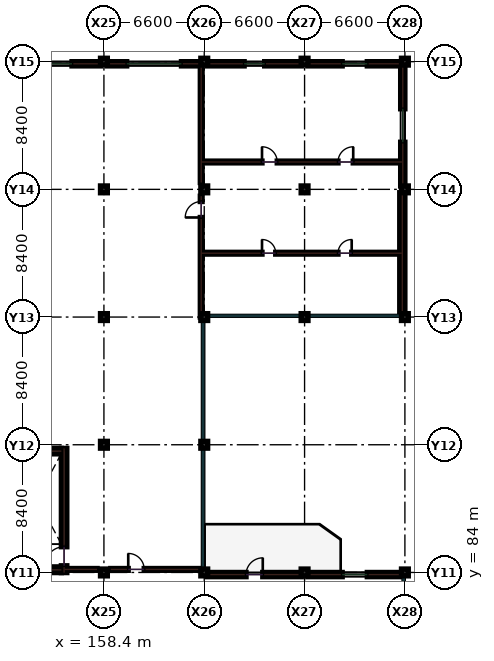
"""IFC4 building model, lengths in metres.
Left out: names, types, materials, properties, quantities, classifications, styles, units other than length and angle.
Written with IfcOpenShell. Run it as: python <this file> out.ifc"""

import sys

from ifc_helpers import new_model, si_unit, direction, frame, frame_2d, origin, origin_2d, place, context, subcontext, project, spatial, rectangle, extrude, element, fill, save


model = new_model("IFC4")
c1 = context("Model", 3, precision=1e-05, world=origin(), true_north=direction((0.0, 1.0)))
c2 = subcontext(c1, "Body", "Model", "MODEL_VIEW")
j1 = project(units=[si_unit("LENGTHUNIT", "METRE"), si_unit("PLANEANGLEUNIT", "RADIAN")], contexts=[c1])
p1 = place(None, origin())
s1 = spatial("IfcSite", under=j1, at=p1, CompositionType="ELEMENT")
p2 = place(p1, origin())
s2 = spatial("IfcBuilding", under=s1, at=p2, CompositionType="ELEMENT")
p3 = place(p2, frame((0.0, 0.0, 14.4)))
s3 = spatial("IfcBuildingStorey", under=s2, at=p3, CompositionType="ELEMENT", Elevation=14.4)
for number, where, z_axis, x_axis in (
    (1, (158.4, 84.0, 0.0), (0.0, 0.0, 1.0), (1.0, 0.0, 0.0)),
    (2, (158.4, 92.4, 0.0), (0.0, 0.0, 1.0), (1.0, 0.0, 0.0)),
    (3, (158.4, 100.8, 0.0), (0.0, 0.0, 1.0), (1.0, 0.0, 0.0)),
    (4, (158.4, 109.2, 0.0), (0.0, 0.0, 1.0), (1.0, 0.0, 0.0)),
    (5, (158.4, 117.6, 0.0), (0.0, 0.0, 1.0), (1.0, 0.0, 0.0)),
    (6, (165.0, 84.0, 0.0), (0.0, 0.0, 1.0), (1.0, 0.0, 0.0)),
    (7, (165.0, 92.4, 0.0), (0.0, 0.0, 1.0), (1.0, 0.0, 0.0)),
    (8, (165.0, 100.8, 0.0), (0.0, 0.0, 1.0), (1.0, 0.0, 0.0)),
    (9, (165.0, 109.2, 0.0), (0.0, 0.0, 1.0), (1.0, 0.0, 0.0)),
    (10, (165.0, 117.6, 0.0), (0.0, 0.0, 1.0), (1.0, 0.0, 0.0)),
    (11, (171.6, 84.0, 0.0), (0.0, 0.0, 1.0), (1.0, 0.0, 0.0)),
    (12, (171.6, 100.8, 0.0), (0.0, 0.0, 1.0), (1.0, 0.0, 0.0)),
    (13, (171.6, 109.2, 0.0), (0.0, 0.0, 1.0), (1.0, 0.0, 0.0)),
    (14, (171.6, 117.6, 0.0), (0.0, 0.0, 1.0), (1.0, 0.0, 0.0)),
    (15, (178.2, 84.0, 0.0), (0.0, 0.0, 1.0), (1.0, 0.0, 0.0)),
    (16, (178.2, 100.8, 0.0), (0.0, 0.0, 1.0), (1.0, 0.0, 0.0)),
    (17, (178.2, 109.2, 0.0), (0.0, 0.0, 1.0), (1.0, 0.0, 0.0)),
    (18, (178.2, 117.6, 0.0), (0.0, 0.0, 1.0), (1.0, 0.0, 0.0)),
):
    element("IfcColumn", number, at=place(p3, frame(where, z_axis=z_axis, x_axis=x_axis)), inside=s3, PredefinedType="COLUMN", context=c2, shape_type="SweptSolid", body=[
        extrude(rectangle(XDim=0.45, YDim=0.45, at=origin_2d()), origin(), (0.0, 0.0, 1.0), 4.2),
    ])
p4 = place(p3, frame((155.8, 84.2, 0.0), z_axis=(0.0, 0.0, 1.0), x_axis=(1.0, 0.0, 0.0)))
e19 = element("IfcWall", 19, at=p4, inside=s3, PredefinedType="PARTITIONING", context=c2, shape_type="SweptSolid", body=[
    extrude(rectangle(XDim=2.15, YDim=0.12, at=frame_2d((1.075, 0.0))), origin(), (0.0, 0.0, 1.0), 3.19),
])
p5 = place(p3, frame((158.85, 84.2, 0.0), z_axis=(0.0, 0.0, 1.0), x_axis=(1.0, 0.0, 0.0)))
e20 = element("IfcWall", 20, at=p5, inside=s3, PredefinedType="PARTITIONING", context=c2, shape_type="SweptSolid", body=[
    extrude(rectangle(XDim=5.83, YDim=0.12, at=frame_2d((2.915, 0.0))), origin(), (0.0, 0.0, 1.0), 3.19),
])
p6 = place(p5, frame((1.15, 0.0, 0.0)))
e21 = element("IfcOpeningElement", 21, at=p6, cuts=e20, PredefinedType="OPENING", context=c2, shape_type="SweptSolid", body=[
    extrude(rectangle(XDim=1.05, YDim=2.15, at=frame_2d((0.525, 1.075))), frame((0.0, 0.07, 0.0), z_axis=(0.0, -1.0, 0.0), x_axis=(1.0, 0.0, 0.0)), (0.0, 0.0, 1.0), 0.14),
])
p7 = place(p3, frame((164.8, 100.8, 0.0), z_axis=(0.0, 0.0, 1.0), x_axis=(0.0, 1.0, 0.0)))
e22 = element("IfcWall", 22, at=p7, inside=s3, PredefinedType="PARTITIONING", context=c2, shape_type="SweptSolid", body=[
    extrude(rectangle(XDim=7.95, YDim=0.12, at=frame_2d((3.975, 0.0))), origin(), (0.0, 0.0, 1.0), 3.19),
])
p8 = place(p7, frame((6.55, 0.0, 0.0)))
e23 = element("IfcOpeningElement", 23, at=p8, cuts=e22, PredefinedType="OPENING", context=c2, shape_type="SweptSolid", body=[
    extrude(rectangle(XDim=1.05, YDim=2.15, at=frame_2d((0.525, 1.075))), frame((0.0, 0.07, 0.0), z_axis=(0.0, -1.0, 0.0), x_axis=(1.0, 0.0, 0.0)), (0.0, 0.0, 1.0), 0.14),
])
p9 = place(p3, frame((164.8, 109.65, 0.0), z_axis=(0.0, 0.0, 1.0), x_axis=(0.0, 1.0, 0.0)))
e24 = element("IfcWall", 24, at=p9, inside=s3, PredefinedType="PARTITIONING", context=c2, shape_type="SweptSolid", body=[
    extrude(rectangle(XDim=7.63, YDim=0.12, at=frame_2d((3.815, 0.0))), origin(), (0.0, 0.0, 1.0), 3.19),
])
p10 = place(p3, frame((164.8, 105.0, 0.0), z_axis=(0.0, 0.0, 1.0), x_axis=(1.0, 0.0, 0.0)))
e25 = element("IfcWall", 25, at=p10, inside=s3, PredefinedType="PARTITIONING", context=c2, shape_type="SweptSolid", body=[
    extrude(rectangle(XDim=13.2, YDim=0.12, at=frame_2d((6.6, 0.0))), origin(), (0.0, 0.0, 1.0), 3.19),
])
p11 = place(p10, frame((4.0, 0.0, 0.0)))
e26 = element("IfcOpeningElement", 26, at=p11, cuts=e25, PredefinedType="OPENING", context=c2, shape_type="SweptSolid", body=[
    extrude(rectangle(XDim=0.9, YDim=2.1, at=frame_2d((0.45, 1.05))), frame((0.0, 0.07, 0.0), z_axis=(0.0, -1.0, 0.0), x_axis=(1.0, 0.0, 0.0)), (0.0, 0.0, 1.0), 0.14),
])
p12 = place(p10, frame((9.0, 0.0, 0.0)))
e27 = element("IfcOpeningElement", 27, at=p12, cuts=e25, PredefinedType="OPENING", context=c2, shape_type="SweptSolid", body=[
    extrude(rectangle(XDim=0.9, YDim=2.1, at=frame_2d((0.45, 1.05))), frame((0.0, 0.07, 0.0), z_axis=(0.0, -1.0, 0.0), x_axis=(1.0, 0.0, 0.0)), (0.0, 0.0, 1.0), 0.14),
])
p13 = place(p3, frame((164.8, 111.0, 0.0), z_axis=(0.0, 0.0, 1.0), x_axis=(1.0, 0.0, 0.0)))
e28 = element("IfcWall", 28, at=p13, inside=s3, PredefinedType="PARTITIONING", context=c2, shape_type="SweptSolid", body=[
    extrude(rectangle(XDim=13.2, YDim=0.12, at=frame_2d((6.6, 0.0))), origin(), (0.0, 0.0, 1.0), 3.19),
])
p14 = place(p13, frame((4.0, 0.0, 0.0)))
e29 = element("IfcOpeningElement", 29, at=p14, cuts=e28, PredefinedType="OPENING", context=c2, shape_type="SweptSolid", body=[
    extrude(rectangle(XDim=1.0, YDim=2.2, at=frame_2d((0.5, 1.1))), frame((0.0, 0.07, 0.0), z_axis=(0.0, -1.0, 0.0), x_axis=(1.0, 0.0, 0.0)), (0.0, 0.0, 1.0), 0.14),
])
p15 = place(p13, frame((9.0, 0.0, 0.0)))
e30 = element("IfcOpeningElement", 30, at=p15, cuts=e28, PredefinedType="OPENING", context=c2, shape_type="SweptSolid", body=[
    extrude(rectangle(XDim=1.0, YDim=2.2, at=frame_2d((0.5, 1.1))), frame((0.0, 0.07, 0.0), z_axis=(0.0, -1.0, 0.0), x_axis=(1.0, 0.0, 0.0)), (0.0, 0.0, 1.0), 0.14),
])
p16 = place(p3, frame((158.18, 117.46, 0.0), z_axis=(0.0, 0.0, 1.0), x_axis=(-1.0, 0.0, 0.0)))
e31 = element("IfcWall", 31, at=p16, inside=s3, PredefinedType="SOLIDWALL", context=c2, shape_type="SweptSolid", body=[
    extrude(rectangle(XDim=6.16, YDim=0.28, at=frame_2d((3.08, 0.0))), origin(), (0.0, 0.0, 1.0), 3.325),
])
p17 = place(p16, frame((1.88, 0.0, 0.95)))
e32 = element("IfcOpeningElement", 32, at=p17, cuts=e31, PredefinedType="OPENING", context=c2, shape_type="SweptSolid", body=[
    extrude(rectangle(XDim=2.4, YDim=1.6, at=frame_2d((1.2, 0.8))), frame((0.0, 0.15, 0.0), z_axis=(0.0, -1.0, 0.0), x_axis=(1.0, 0.0, 0.0)), (0.0, 0.0, 1.0), 0.3),
])
p18 = place(p3, frame((164.78, 117.46, 0.0), z_axis=(0.0, 0.0, 1.0), x_axis=(-1.0, 0.0, 0.0)))
e33 = element("IfcWall", 33, at=p18, inside=s3, PredefinedType="SOLIDWALL", context=c2, shape_type="SweptSolid", body=[
    extrude(rectangle(XDim=6.16, YDim=0.28, at=frame_2d((3.08, 0.0))), origin(), (0.0, 0.0, 1.0), 3.325),
])
p19 = place(p18, frame((1.28, 0.0, 0.95)))
e34 = element("IfcOpeningElement", 34, at=p19, cuts=e33, PredefinedType="OPENING", context=c2, shape_type="SweptSolid", body=[
    extrude(rectangle(XDim=3.6, YDim=2.0, at=frame_2d((1.8, 1.0))), frame((0.0, 0.15, 0.0), z_axis=(0.0, -1.0, 0.0), x_axis=(1.0, 0.0, 0.0)), (0.0, 0.0, 1.0), 0.3),
])
p20 = place(p3, frame((171.38, 83.86, 0.0), z_axis=(0.0, 0.0, 1.0), x_axis=(-1.0, 0.0, 0.0)))
e35 = element("IfcWall", 35, at=p20, inside=s3, PredefinedType="SOLIDWALL", context=c2, shape_type="SweptSolid", body=[
    extrude(rectangle(XDim=6.16, YDim=0.28, at=frame_2d((3.08, 0.0))), origin(), (0.0, 0.0, 1.0), 3.325),
])
p21 = place(p20, frame((2.53, 0.0, 0.0)))
e36 = element("IfcOpeningElement", 36, at=p21, cuts=e35, PredefinedType="OPENING", context=c2, shape_type="SweptSolid", body=[
    extrude(rectangle(XDim=1.1, YDim=2.2, at=frame_2d((0.55, 1.1))), frame((0.0, 0.15, 0.0), z_axis=(0.0, -1.0, 0.0), x_axis=(1.0, 0.0, 0.0)), (0.0, 0.0, 1.0), 0.3),
])
p22 = place(p3, frame((171.38, 117.46, 0.0), z_axis=(0.0, 0.0, 1.0), x_axis=(-1.0, 0.0, 0.0)))
e37 = element("IfcWall", 37, at=p22, inside=s3, PredefinedType="SOLIDWALL", context=c2, shape_type="SweptSolid", body=[
    extrude(rectangle(XDim=6.16, YDim=0.28, at=frame_2d((3.08, 0.0))), origin(), (0.0, 0.0, 1.0), 3.325),
])
p23 = place(p22, frame((2.405, 0.0, 0.95)))
e38 = element("IfcOpeningElement", 38, at=p23, cuts=e37, PredefinedType="OPENING", context=c2, shape_type="SweptSolid", body=[
    extrude(rectangle(XDim=1.35, YDim=1.55, at=frame_2d((0.675, 0.775))), frame((0.0, 0.15, 0.0), z_axis=(0.0, -1.0, 0.0), x_axis=(1.0, 0.0, 0.0)), (0.0, 0.0, 1.0), 0.3),
])
p24 = place(p3, frame((177.98, 83.86, 0.0), z_axis=(0.0, 0.0, 1.0), x_axis=(-1.0, 0.0, 0.0)))
e39 = element("IfcWall", 39, at=p24, inside=s3, PredefinedType="SOLIDWALL", context=c2, shape_type="SweptSolid", body=[
    extrude(rectangle(XDim=6.16, YDim=0.28, at=frame_2d((3.08, 0.0))), origin(), (0.0, 0.0, 1.0), 3.325),
])
p25 = place(p24, frame((2.255, 0.0, 0.95)))
e40 = element("IfcOpeningElement", 40, at=p25, cuts=e39, PredefinedType="OPENING", context=c2, shape_type="SweptSolid", body=[
    extrude(rectangle(XDim=1.65, YDim=1.55, at=frame_2d((0.825, 0.775))), frame((0.0, 0.15, 0.0), z_axis=(0.0, -1.0, 0.0), x_axis=(1.0, 0.0, 0.0)), (0.0, 0.0, 1.0), 0.3),
])
p26 = place(p3, frame((178.03, 101.02, 0.0), z_axis=(0.0, 0.0, 1.0), x_axis=(0.0, 1.0, 0.0)))
e41 = element("IfcWall", 41, at=p26, inside=s3, PredefinedType="SHEAR", context=c2, shape_type="SweptSolid", body=[
    extrude(rectangle(XDim=7.96, YDim=0.34, at=frame_2d((3.98, 0.0))), origin(), (0.0, 0.0, 1.0), 3.94),
])
p27 = place(p3, frame((178.06, 109.42, 0.0), z_axis=(0.0, 0.0, 1.0), x_axis=(0.0, 1.0, 0.0)))
e42 = element("IfcWall", 42, at=p27, inside=s3, PredefinedType="SOLIDWALL", context=c2, shape_type="SweptSolid", body=[
    extrude(rectangle(XDim=7.96, YDim=0.28, at=frame_2d((3.98, 0.0))), origin(), (0.0, 0.0, 1.0), 3.375),
])
p28 = place(p27, frame((2.88, 0.0, 0.95)))
e43 = element("IfcOpeningElement", 43, at=p28, cuts=e42, PredefinedType="OPENING", context=c2, shape_type="SweptSolid", body=[
    extrude(rectangle(XDim=2.2, YDim=1.85, at=frame_2d((1.1, 0.925))), frame((0.0, 0.15, 0.0), z_axis=(0.0, -1.0, 0.0), x_axis=(1.0, 0.0, 0.0)), (0.0, 0.0, 1.0), 0.3),
])
p29 = place(p3, frame((177.98, 117.46, 0.0), z_axis=(0.0, 0.0, 1.0), x_axis=(-1.0, 0.0, 0.0)))
e44 = element("IfcWall", 44, at=p29, inside=s3, PredefinedType="SOLIDWALL", context=c2, shape_type="SweptSolid", body=[
    extrude(rectangle(XDim=6.16, YDim=0.28, at=frame_2d((3.08, 0.0))), origin(), (0.0, 0.0, 1.0), 3.325),
])
p30 = place(p29, frame((2.255, 0.0, 0.95)))
e45 = element("IfcOpeningElement", 45, at=p30, cuts=e44, PredefinedType="OPENING", context=c2, shape_type="SweptSolid", body=[
    extrude(rectangle(XDim=1.65, YDim=1.55, at=frame_2d((0.825, 0.775))), frame((0.0, 0.15, 0.0), z_axis=(0.0, -1.0, 0.0), x_axis=(1.0, 0.0, 0.0)), (0.0, 0.0, 1.0), 0.3),
])
p31 = place(p3, frame((155.78, 83.99, 0.0), z_axis=(0.0, 0.0, 1.0), x_axis=(0.0, 1.0, 0.0)))
e46 = element("IfcWall", 46, at=p31, inside=s3, PredefinedType="SHEAR", context=c2, shape_type="SweptSolid", body=[
    extrude(rectangle(XDim=8.17, YDim=0.36, at=frame_2d((4.085, 0.0))), origin(), (0.0, 0.0, 1.0), 3.94),
])
p32 = place(p31, frame((0.45, 0.0, 0.0)))
e47 = element("IfcOpeningElement", 47, at=p32, cuts=e46, PredefinedType="OPENING", context=c2, shape_type="SweptSolid", body=[
    extrude(rectangle(XDim=1.25, YDim=2.15, at=frame_2d((0.625, 1.075))), frame((0.0, 0.19, 0.0), z_axis=(0.0, -1.0, 0.0), x_axis=(1.0, 0.0, 0.0)), (0.0, 0.0, 1.0), 0.38),
])
for number, where, z_axis, x_axis in (
    (48, (152.4, 91.98, 0.0), (0.0, 0.0, 1.0), (1.0, 0.0, 0.0)),
    (49, (152.4, 84.17, 0.0), (0.0, 0.0, 1.0), (1.0, 0.0, 0.0)),
):
    element("IfcWall", number, at=place(p3, frame(where, z_axis=z_axis, x_axis=x_axis)), inside=s3, PredefinedType="SHEAR", context=c2, shape_type="SweptSolid", body=[
        extrude(rectangle(XDim=3.2, YDim=0.36, at=frame_2d((1.6, 0.0))), origin(), (0.0, 0.0, 1.0), 3.94),
    ])
p33 = place(p6, origin())
e50 = element("IfcDoor", 50, at=p33, inside=s3, OperationType="SINGLE_SWING_LEFT", PredefinedType="DOOR", context=c2, shape_type="SweptSolid", body=[
    extrude(rectangle(XDim=1.05, YDim=2.15, at=frame_2d((0.525, 1.075))), frame((0.0, 0.025, 0.0), z_axis=(0.0, -1.0, 0.0), x_axis=(1.0, 0.0, 0.0)), (0.0, 0.0, 1.0), 0.05),
])
fill(e21, e50)
p34 = place(p8, origin())
e51 = element("IfcDoor", 51, at=p34, inside=s3, OperationType="SINGLE_SWING_LEFT", PredefinedType="DOOR", context=c2, shape_type="SweptSolid", body=[
    extrude(rectangle(XDim=1.05, YDim=2.15, at=frame_2d((0.525, 1.075))), frame((0.0, 0.025, 0.0), z_axis=(0.0, -1.0, 0.0), x_axis=(1.0, 0.0, 0.0)), (0.0, 0.0, 1.0), 0.05),
])
fill(e23, e51)
p35 = place(p11, origin())
e52 = element("IfcDoor", 52, at=p35, inside=s3, OperationType="SINGLE_SWING_LEFT", PredefinedType="DOOR", context=c2, shape_type="SweptSolid", body=[
    extrude(rectangle(XDim=0.9, YDim=2.1, at=frame_2d((0.45, 1.05))), frame((0.0, 0.025, 0.0), z_axis=(0.0, -1.0, 0.0), x_axis=(1.0, 0.0, 0.0)), (0.0, 0.0, 1.0), 0.05),
])
fill(e26, e52)
p36 = place(p12, origin())
e53 = element("IfcDoor", 53, at=p36, inside=s3, OperationType="SINGLE_SWING_RIGHT", PredefinedType="DOOR", context=c2, shape_type="SweptSolid", body=[
    extrude(rectangle(XDim=0.9, YDim=2.1, at=frame_2d((0.45, 1.05))), frame((0.0, 0.025, 0.0), z_axis=(0.0, -1.0, 0.0), x_axis=(1.0, 0.0, 0.0)), (0.0, 0.0, 1.0), 0.05),
])
fill(e27, e53)
p37 = place(p14, origin())
e54 = element("IfcDoor", 54, at=p37, inside=s3, OperationType="SINGLE_SWING_LEFT", PredefinedType="DOOR", context=c2, shape_type="SweptSolid", body=[
    extrude(rectangle(XDim=1.0, YDim=2.2, at=frame_2d((0.5, 1.1))), frame((0.0, 0.025, 0.0), z_axis=(0.0, -1.0, 0.0), x_axis=(1.0, 0.0, 0.0)), (0.0, 0.0, 1.0), 0.05),
])
fill(e29, e54)
p38 = place(p15, origin())
e55 = element("IfcDoor", 55, at=p38, inside=s3, OperationType="SINGLE_SWING_RIGHT", PredefinedType="DOOR", context=c2, shape_type="SweptSolid", body=[
    extrude(rectangle(XDim=1.0, YDim=2.2, at=frame_2d((0.5, 1.1))), frame((0.0, 0.025, 0.0), z_axis=(0.0, -1.0, 0.0), x_axis=(1.0, 0.0, 0.0)), (0.0, 0.0, 1.0), 0.05),
])
fill(e30, e55)
p39 = place(p17, origin())
e56 = element("IfcWindow", 56, at=p39, inside=s3, PartitioningType="SINGLE_PANEL", PredefinedType="WINDOW", context=c2, shape_type="SweptSolid", body=[
    extrude(rectangle(XDim=2.4, YDim=1.6, at=frame_2d((1.2, 0.8))), frame((0.0, 0.03, 0.0), z_axis=(0.0, -1.0, 0.0), x_axis=(1.0, 0.0, 0.0)), (0.0, 0.0, 1.0), 0.06),
])
fill(e32, e56)
p40 = place(p19, origin())
e57 = element("IfcWindow", 57, at=p40, inside=s3, PartitioningType="SINGLE_PANEL", PredefinedType="WINDOW", context=c2, shape_type="SweptSolid", body=[
    extrude(rectangle(XDim=3.6, YDim=2.0, at=frame_2d((1.8, 1.0))), frame((0.0, 0.03, 0.0), z_axis=(0.0, -1.0, 0.0), x_axis=(1.0, 0.0, 0.0)), (0.0, 0.0, 1.0), 0.06),
])
fill(e34, e57)
p41 = place(p21, frame((1.1, 0.0, 0.0), z_axis=(0.0, 0.0, 1.0), x_axis=(-1.0, 0.0, 0.0)))
e58 = element("IfcDoor", 58, at=p41, inside=s3, OperationType="SINGLE_SWING_LEFT", PredefinedType="DOOR", context=c2, shape_type="SweptSolid", body=[
    extrude(rectangle(XDim=1.1, YDim=2.2, at=frame_2d((0.55, 1.1))), frame((0.0, 0.025, 0.0), z_axis=(0.0, -1.0, 0.0), x_axis=(1.0, 0.0, 0.0)), (0.0, 0.0, 1.0), 0.05),
])
fill(e36, e58)
p42 = place(p23, origin())
e59 = element("IfcWindow", 59, at=p42, inside=s3, PartitioningType="SINGLE_PANEL", PredefinedType="WINDOW", context=c2, shape_type="SweptSolid", body=[
    extrude(rectangle(XDim=1.35, YDim=1.55, at=frame_2d((0.675, 0.775))), frame((0.0, 0.03, 0.0), z_axis=(0.0, -1.0, 0.0), x_axis=(1.0, 0.0, 0.0)), (0.0, 0.0, 1.0), 0.06),
])
fill(e38, e59)
p43 = place(p25, origin())
e60 = element("IfcWindow", 60, at=p43, inside=s3, PartitioningType="SINGLE_PANEL", PredefinedType="WINDOW", context=c2, shape_type="SweptSolid", body=[
    extrude(rectangle(XDim=1.65, YDim=1.55, at=frame_2d((0.825, 0.775))), frame((0.0, 0.03, 0.0), z_axis=(0.0, -1.0, 0.0), x_axis=(1.0, 0.0, 0.0)), (0.0, 0.0, 1.0), 0.06),
])
fill(e40, e60)
p44 = place(p28, origin())
e61 = element("IfcWindow", 61, at=p44, inside=s3, PartitioningType="SINGLE_PANEL", PredefinedType="WINDOW", context=c2, shape_type="SweptSolid", body=[
    extrude(rectangle(XDim=2.2, YDim=1.85, at=frame_2d((1.1, 0.925))), frame((0.0, 0.03, 0.0), z_axis=(0.0, -1.0, 0.0), x_axis=(1.0, 0.0, 0.0)), (0.0, 0.0, 1.0), 0.06),
])
fill(e43, e61)
p45 = place(p30, origin())
e62 = element("IfcWindow", 62, at=p45, inside=s3, PartitioningType="SINGLE_PANEL", PredefinedType="WINDOW", context=c2, shape_type="SweptSolid", body=[
    extrude(rectangle(XDim=1.65, YDim=1.55, at=frame_2d((0.825, 0.775))), frame((0.0, 0.03, 0.0), z_axis=(0.0, -1.0, 0.0), x_axis=(1.0, 0.0, 0.0)), (0.0, 0.0, 1.0), 0.06),
])
fill(e45, e62)
p46 = place(p32, origin())
e63 = element("IfcDoor", 63, at=p46, inside=s3, OperationType="SINGLE_SWING_LEFT", PredefinedType="DOOR", context=c2, shape_type="SweptSolid", body=[
    extrude(rectangle(XDim=1.25, YDim=2.15, at=frame_2d((0.625, 1.075))), frame((0.0, 0.025, 0.0), z_axis=(0.0, -1.0, 0.0), x_axis=(1.0, 0.0, 0.0)), (0.0, 0.0, 1.0), 0.05),
])
fill(e47, e63)
save(model, sys.argv[1])
